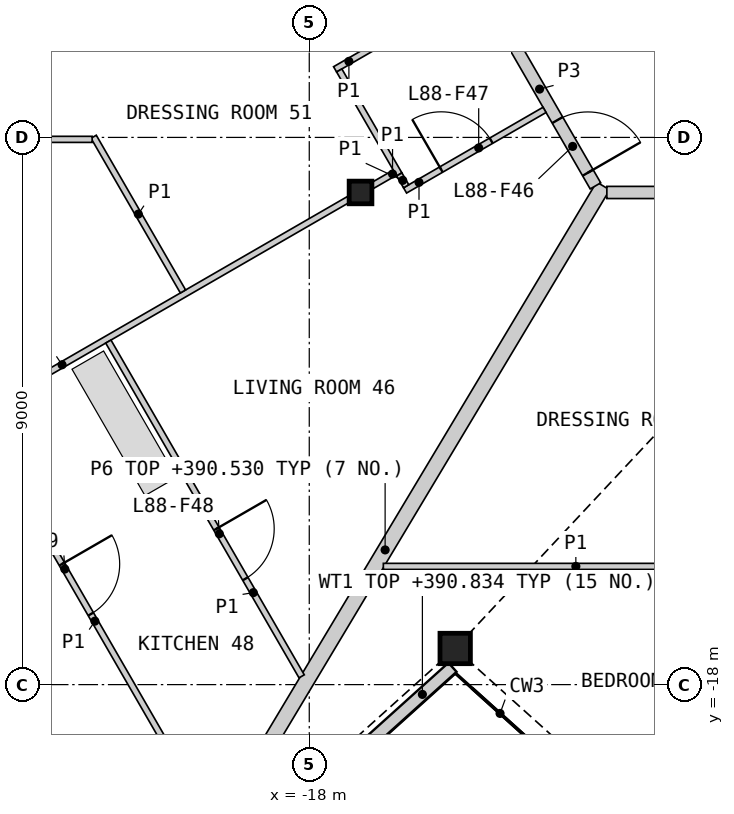
"""IFC4 building model, lengths in metres.
Left out: names, types, materials, properties, quantities, classifications, styles, units other than length and angle.
Written with IfcOpenShell. Run it as: python <this file> out.ifc"""

import sys

from ifc_helpers import new_model, si_unit, direction, frame, frame_2d, origin, origin_2d, place, context, subcontext, project, spatial, rectangle, hollow_rectangle, i_section, extrude, element, fill, save


model = new_model("IFC4")
c1 = context("Model", 3, precision=1e-05, world=origin(), true_north=direction((0.0, 1.0)))
c2 = subcontext(c1, "Body", "Model", "MODEL_VIEW")
j1 = project(units=[si_unit("LENGTHUNIT", "METRE"), si_unit("PLANEANGLEUNIT", "RADIAN")], contexts=[c1])
p1 = place(None, origin())
s1 = spatial("IfcSite", under=j1, at=p1, CompositionType="ELEMENT")
p2 = place(p1, origin())
s2 = spatial("IfcBuilding", under=s1, at=p2, CompositionType="ELEMENT")
p3 = place(p2, frame((0.0, 0.0, 388.2)))
s3 = spatial("IfcBuildingStorey", under=s2, at=p3, CompositionType="ELEMENT", Elevation=388.2)
p4 = place(p3, frame((-15.6, -17.406, 0.0), z_axis=(0.0, 0.0, 1.0), x_axis=(1.0, 0.0, 0.0)))
e1 = element("IfcColumn", 1, at=p4, inside=s3, PredefinedType="COLUMN", context=c2, shape_type="SweptSolid", body=[
    extrude(hollow_rectangle(XDim=0.5, YDim=0.5, WallThickness=0.03, at=origin_2d()), origin(), (0.0, 0.0, 1.0), 3.4),
])
p5 = place(p3, frame((-17.157, -9.906, 0.0), z_axis=(0.0, 0.0, 1.0), x_axis=(1.0, 0.0, 0.0)))
e2 = element("IfcColumn", 2, at=p5, inside=s3, PredefinedType="COLUMN", context=c2, shape_type="SweptSolid", body=[
    extrude(i_section(OverallWidth=0.374, OverallDepth=0.372, WebThickness=0.016, FlangeThickness=0.026, at=origin_2d()), origin(), (0.0, 0.0, 1.0), 3.4),
])
p6 = place(p3, frame((-20.595, -22.173, 0.0), z_axis=(0.0, 0.0, 1.0), x_axis=(0.743135582201, 0.669140871915, 0.0)))
e3 = element("IfcWall", 3, at=p6, inside=s3, PredefinedType="SOLIDWALL", context=c2, shape_type="SweptSolid", body=[
    extrude(rectangle(XDim=6.662, YDim=0.2, at=frame_2d((3.331, 0.0))), origin(), (0.0, 0.0, 1.0), 2.634),
])
p7 = place(p6, frame((2.333, 0.0, 0.0)))
e4 = element("IfcOpeningElement", 4, at=p7, cuts=e3, PredefinedType="OPENING", context=c2, shape_type="SweptSolid", body=[
    extrude(rectangle(XDim=1.6, YDim=2.25, at=frame_2d((0.8, 1.125))), frame((0.0, 0.11, 0.0), z_axis=(0.0, -1.0, 0.0), x_axis=(1.0, 0.0, 0.0)), (0.0, 0.0, 1.0), 0.22),
])
p8 = place(p3, frame((-20.338, -21.771, 0.0), z_axis=(0.0, 0.0, 1.0), x_axis=(0.513878217441, 0.857863146218, 0.0)))
e5 = element("IfcWall", 5, at=p8, inside=s3, PredefinedType="PARTITIONING", context=c2, shape_type="SweptSolid", body=[
    extrude(rectangle(XDim=13.956, YDim=0.25, at=frame_2d((6.978, 0.0))), origin(), (0.0, 0.0, 1.0), 2.33),
])
p9 = place(p3, frame((-13.106, -9.906, 0.0), z_axis=(0.0, 0.0, 1.0), x_axis=(1.0, 0.0, 0.0)))
e6 = element("IfcWall", 6, at=p9, inside=s3, PredefinedType="PARTITIONING", context=c2, shape_type="SweptSolid", body=[
    extrude(rectangle(XDim=4.331, YDim=0.2, at=frame_2d((2.165, 0.0))), origin(), (0.0, 0.0, 1.0), 3.1),
])
p10 = place(p3, frame((-15.131, -6.614, 0.0), z_axis=(0.0, 0.0, 1.0), x_axis=(0.499967746641, -0.866044024469, 0.0)))
e7 = element("IfcWall", 7, at=p10, inside=s3, PredefinedType="PARTITIONING", context=c2, shape_type="SweptSolid", body=[
    extrude(rectangle(XDim=3.676, YDim=0.2, at=frame_2d((1.838, 0.0))), origin(), (0.0, 0.0, 1.0), 3.1),
])
p11 = place(p10, frame((2.426, 0.0, 0.0)))
e8 = element("IfcOpeningElement", 8, at=p11, cuts=e7, PredefinedType="OPENING", context=c2, shape_type="SweptSolid", body=[
    extrude(rectangle(XDim=1.0, YDim=2.1, at=frame_2d((0.5, 1.05))), frame((0.0, 0.11, 0.0), z_axis=(0.0, -1.0, 0.0), x_axis=(1.0, 0.0, 0.0)), (0.0, 0.0, 1.0), 0.22),
])
p12 = place(p3, frame((-26.777, -15.46, 0.0), z_axis=(0.0, 0.0, 1.0), x_axis=(0.866019680922, 0.500009912158, 0.0)))
e9 = element("IfcWall", 9, at=p12, inside=s3, PredefinedType="PARTITIONING", context=c2, shape_type="SweptSolid", body=[
    extrude(rectangle(XDim=10.881, YDim=0.1, at=frame_2d((5.44, 0.0))), origin(), (0.0, 0.0, 1.0), 2.33),
])
p13 = place(p12, frame((1.454, 0.0, 0.0)))
e10 = element("IfcOpeningElement", 10, at=p13, cuts=e9, PredefinedType="OPENING", context=c2, shape_type="SweptSolid", body=[
    extrude(rectangle(XDim=0.95, YDim=2.1, at=frame_2d((0.475, 1.05))), frame((0.0, 0.06, 0.0), z_axis=(0.0, -1.0, 0.0), x_axis=(1.0, 0.0, 0.0)), (0.0, 0.0, 1.0), 0.12),
])
p14 = place(p3, frame((-23.462, -13.603, 0.0), z_axis=(0.0, 0.0, 1.0), x_axis=(0.499998111909, -0.866026493871, 0.0)))
e11 = element("IfcWall", 11, at=p14, inside=s3, PredefinedType="PARTITIONING", context=c2, shape_type="SweptSolid", body=[
    extrude(rectangle(XDim=7.743, YDim=0.1, at=frame_2d((3.872, 0.0))), origin(), (0.0, 0.0, 1.0), 2.33),
])
p15 = place(p14, frame((2.788, 0.0, 0.0)))
e12 = element("IfcOpeningElement", 12, at=p15, cuts=e11, PredefinedType="OPENING", context=c2, shape_type="SweptSolid", body=[
    extrude(rectangle(XDim=0.95, YDim=2.1, at=frame_2d((0.475, 1.05))), frame((0.0, 0.06, 0.0), z_axis=(0.0, -1.0, 0.0), x_axis=(1.0, 0.0, 0.0)), (0.0, 0.0, 1.0), 0.12),
])
p16 = place(p3, frame((-21.304, -12.358, 0.0), z_axis=(0.0, 0.0, 1.0), x_axis=(0.500000558108, -0.866025081561, 0.0)))
e13 = element("IfcWall", 13, at=p16, inside=s3, PredefinedType="PARTITIONING", context=c2, shape_type="SweptSolid", body=[
    extrude(rectangle(XDim=6.358, YDim=0.1, at=frame_2d((3.179, 0.0))), origin(), (0.0, 0.0, 1.0), 2.33),
])
p17 = place(p16, frame((3.555, 0.0, 0.0)))
e14 = element("IfcOpeningElement", 14, at=p17, cuts=e13, PredefinedType="OPENING", context=c2, shape_type="SweptSolid", body=[
    extrude(rectangle(XDim=0.95, YDim=2.1, at=frame_2d((0.475, 1.05))), frame((0.0, 0.06, 0.0), z_axis=(0.0, -1.0, 0.0), x_axis=(1.0, 0.0, 0.0)), (0.0, 0.0, 1.0), 0.12),
])
p18 = place(p3, frame((-16.781, -16.055, 0.0), z_axis=(0.0, 0.0, 1.0), x_axis=(1.0, 0.0, 0.0)))
e15 = element("IfcWall", 15, at=p18, inside=s3, PredefinedType="PARTITIONING", context=c2, shape_type="SweptSolid", body=[
    extrude(rectangle(XDim=6.332, YDim=0.1, at=frame_2d((3.166, 0.0))), origin(), (0.0, 0.0, 1.0), 2.33),
])
p19 = place(p18, frame((4.623, 0.0, 0.0)))
e16 = element("IfcOpeningElement", 16, at=p19, cuts=e15, PredefinedType="OPENING", context=c2, shape_type="SweptSolid", body=[
    extrude(rectangle(XDim=0.95, YDim=2.1, at=frame_2d((0.475, 1.05))), frame((0.0, 0.06, 0.0), z_axis=(0.0, -1.0, 0.0), x_axis=(1.0, 0.0, 0.0)), (0.0, 0.0, 1.0), 0.12),
])
p20 = place(p3, frame((-21.546, -8.989, 0.0), z_axis=(0.0, 0.0, 1.0), x_axis=(0.499919039967, -0.866072141036, 0.0)))
e17 = element("IfcWall", 17, at=p20, inside=s3, PredefinedType="PARTITIONING", context=c2, shape_type="SweptSolid", body=[
    extrude(rectangle(XDim=2.938, YDim=0.1, at=frame_2d((1.469, 0.0))), origin(), (0.0, 0.0, 1.0), 2.33),
])
p21 = place(p3, frame((-24.489, -9.032, 0.0), z_axis=(0.0, 0.0, 1.0), x_axis=(1.0, 0.0, 0.0)))
e18 = element("IfcWall", 18, at=p21, inside=s3, PredefinedType="PARTITIONING", context=c2, shape_type="SweptSolid", body=[
    extrude(rectangle(XDim=2.917, YDim=0.1, at=frame_2d((1.459, 0.0))), origin(), (0.0, 0.0, 1.0), 2.33),
])
p22 = place(p21, frame((0.355, 0.0, 0.0)))
e19 = element("IfcOpeningElement", 19, at=p22, cuts=e18, PredefinedType="OPENING", context=c2, shape_type="SweptSolid", body=[
    extrude(rectangle(XDim=0.95, YDim=2.1, at=frame_2d((0.475, 1.05))), frame((0.0, 0.06, 0.0), z_axis=(0.0, -1.0, 0.0), x_axis=(1.0, 0.0, 0.0)), (0.0, 0.0, 1.0), 0.12),
])
p23 = place(p3, frame((-17.575, -7.881, 0.0), z_axis=(0.0, 0.0, 1.0), x_axis=(0.866036909293, 0.499980071345, 0.0)))
e20 = element("IfcWall", 20, at=p23, inside=s3, PredefinedType="PARTITIONING", context=c2, shape_type="SweptSolid", body=[
    extrude(rectangle(XDim=2.625, YDim=0.1, at=frame_2d((1.312, 0.0))), origin(), (0.0, 0.0, 1.0), 2.33),
])
p24 = place(p3, frame((-16.425, -9.872, 0.0), z_axis=(0.0, 0.0, 1.0), x_axis=(0.86603978909, 0.499975083092, 0.0)))
e21 = element("IfcWall", 21, at=p24, inside=s3, PredefinedType="PARTITIONING", context=c2, shape_type="SweptSolid", body=[
    extrude(rectangle(XDim=2.649, YDim=0.1, at=frame_2d((1.325, 0.0))), origin(), (0.0, 0.0, 1.0), 2.33),
])
p25 = place(p24, frame((0.686, 0.0, 0.0)))
e22 = element("IfcOpeningElement", 22, at=p25, cuts=e21, PredefinedType="OPENING", context=c2, shape_type="SweptSolid", body=[
    extrude(rectangle(XDim=0.95, YDim=2.1, at=frame_2d((0.475, 1.05))), frame((0.0, 0.06, 0.0), z_axis=(0.0, -1.0, 0.0), x_axis=(1.0, 0.0, 0.0)), (0.0, 0.0, 1.0), 0.12),
])
p26 = place(p3, frame((-17.507, -7.899, 0.0), z_axis=(0.0, 0.0, 1.0), x_axis=(0.500011643316, -0.866018681408, 0.0)))
e23 = element("IfcWall", 23, at=p26, inside=s3, PredefinedType="PARTITIONING", context=c2, shape_type="SweptSolid", body=[
    extrude(rectangle(XDim=1.973, YDim=0.1, at=frame_2d((0.987, 0.0))), origin(), (0.0, 0.0, 1.0), 2.33),
])
p27 = place(p3, frame((-16.96, -9.792, 0.0), z_axis=(0.0, 0.0, 1.0), x_axis=(0.866137484628, 0.499805820016, 0.0)))
e24 = element("IfcWall", 24, at=p27, inside=s3, PredefinedType="PARTITIONING", context=c2, shape_type="SweptSolid", body=[
    extrude(rectangle(XDim=0.423, YDim=0.1, at=frame_2d((0.211, 0.0))), origin(), (0.0, 0.0, 1.0), 2.33),
])
p28 = place(p3, frame((-16.519, -9.61, 0.0), z_axis=(0.0, 0.0, 1.0), x_axis=(0.50245032488, -0.864606078528, 0.0)))
e25 = element("IfcWall", 25, at=p28, inside=s3, PredefinedType="PARTITIONING", context=c2, shape_type="SweptSolid", body=[
    extrude(rectangle(XDim=0.224, YDim=0.1, at=frame_2d((0.112, 0.0))), origin(), (0.0, 0.0, 1.0), 2.33),
])
p29 = place(p11, origin())
e26 = element("IfcDoor", 26, at=p29, inside=s3, OperationType="SINGLE_SWING_RIGHT", PredefinedType="DOOR", context=c2, shape_type="SweptSolid", body=[
    extrude(rectangle(XDim=1.0, YDim=2.1, at=frame_2d((0.5, 1.05))), frame((0.0, 0.025, 0.0), z_axis=(0.0, -1.0, 0.0), x_axis=(1.0, 0.0, 0.0)), (0.0, 0.0, 1.0), 0.05),
])
fill(e8, e26)
p30 = place(p25, origin())
e27 = element("IfcDoor", 27, at=p30, inside=s3, OperationType="SINGLE_SWING_LEFT", PredefinedType="DOOR", context=c2, shape_type="SweptSolid", body=[
    extrude(rectangle(XDim=0.95, YDim=2.1, at=frame_2d((0.475, 1.05))), frame((0.0, 0.025, 0.0), z_axis=(0.0, -1.0, 0.0), x_axis=(1.0, 0.0, 0.0)), (0.0, 0.0, 1.0), 0.05),
])
fill(e22, e27)
p31 = place(p17, origin())
e28 = element("IfcDoor", 28, at=p31, inside=s3, OperationType="SINGLE_SWING_LEFT", PredefinedType="DOOR", context=c2, shape_type="SweptSolid", body=[
    extrude(rectangle(XDim=0.95, YDim=2.1, at=frame_2d((0.475, 1.05))), frame((0.0, 0.025, 0.0), z_axis=(0.0, -1.0, 0.0), x_axis=(1.0, 0.0, 0.0)), (0.0, 0.0, 1.0), 0.05),
])
fill(e14, e28)
p32 = place(p15, origin())
e29 = element("IfcDoor", 29, at=p32, inside=s3, OperationType="SINGLE_SWING_LEFT", PredefinedType="DOOR", context=c2, shape_type="SweptSolid", body=[
    extrude(rectangle(XDim=0.95, YDim=2.1, at=frame_2d((0.475, 1.05))), frame((0.0, 0.025, 0.0), z_axis=(0.0, -1.0, 0.0), x_axis=(1.0, 0.0, 0.0)), (0.0, 0.0, 1.0), 0.05),
])
fill(e12, e29)
save(model, sys.argv[1])
